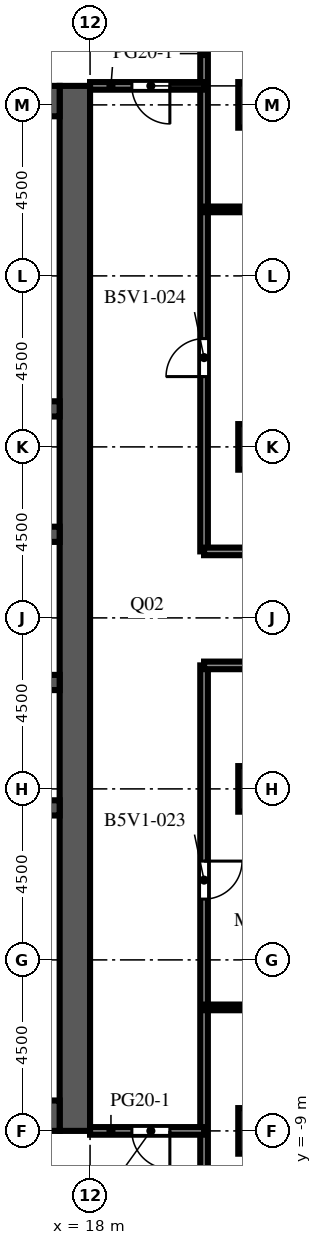
"""IFC4 building model, lengths in metres.
Left out: names, types, materials, properties, quantities, classifications, styles, units other than length and angle.
Written with IfcOpenShell. Run it as: python <this file> out.ifc"""

import sys

from ifc_helpers import new_model, si_unit, direction, frame, frame_2d, origin, origin_2d, place, context, subcontext, project, spatial, rectangle, extrude, element, fill, save


model = new_model("IFC4")
c1 = context("Model", 3, precision=1e-05, world=origin(), true_north=direction((0.0, 1.0)))
c2 = subcontext(c1, "Body", "Model", "MODEL_VIEW")
j1 = project(units=[si_unit("LENGTHUNIT", "METRE"), si_unit("PLANEANGLEUNIT", "RADIAN")], contexts=[c1])
p1 = place(None, origin())
s1 = spatial("IfcSite", under=j1, at=p1, CompositionType="ELEMENT")
p2 = place(p1, origin())
s2 = spatial("IfcBuilding", under=s1, at=p2, CompositionType="ELEMENT")
p3 = place(p2, frame((0.0, 0.0, 173.2)))
s3 = spatial("IfcBuildingStorey", under=s2, at=p3, CompositionType="ELEMENT", Elevation=173.2)
for number, where, z_axis, x_axis in (
    (1, (22.5, -9.0, 0.0), (0.0, 0.0, 1.0), (1.0, 0.0, 0.0)),
    (2, (22.5, 0.0, 0.0), (0.0, 0.0, 1.0), (1.0, 0.0, 0.0)),
    (3, (22.5, 9.0, 0.0), (0.0, 0.0, 1.0), (1.0, 0.0, 0.0)),
    (4, (22.5, 18.0, 0.0), (0.0, 0.0, 1.0), (1.0, 0.0, 0.0)),
):
    element("IfcColumn", number, at=place(p3, frame(where, z_axis=z_axis, x_axis=x_axis)), inside=s3, PredefinedType="COLUMN", context=c2, shape_type="SweptSolid", body=[
        extrude(rectangle(XDim=1.2, YDim=1.2, at=origin_2d()), origin(), (0.0, 0.0, 1.0), 4.1),
    ])
p4 = place(p3, frame((17.6, -9.0, 0.0), z_axis=(0.0, 0.0, 1.0), x_axis=(0.0, 1.0, 0.0)))
e5 = element("IfcWall", 5, at=p4, inside=s3, PredefinedType="SHEAR", context=c2, shape_type="SweptSolid", body=[
    extrude(rectangle(XDim=27.5, YDim=0.8, at=frame_2d((13.75, 0.0))), origin(), (0.0, 0.0, 1.0), 4.1),
])
p5 = place(p4, frame((12.55, 0.0, 0.0)))
e6 = element("IfcOpeningElement", 6, at=p5, cuts=e5, PredefinedType="OPENING", context=c2, shape_type="SweptSolid", body=[
    extrude(rectangle(XDim=2.4, YDim=2.4, at=frame_2d((1.2, 1.2))), frame((0.0, 0.41, 0.0), z_axis=(0.0, -1.0, 0.0), x_axis=(1.0, 0.0, 0.0)), (0.0, 0.0, 1.0), 0.82),
])
p6 = place(p4, frame((6.825, 0.0, 0.0)))
e7 = element("IfcOpeningElement", 7, at=p6, cuts=e5, PredefinedType="OPENING", context=c2, shape_type="SweptSolid", body=[
    extrude(rectangle(XDim=1.2, YDim=2.1, at=frame_2d((0.6, 1.05))), frame((0.0, 0.41, 0.0), z_axis=(0.0, -1.0, 0.0), x_axis=(1.0, 0.0, 0.0)), (0.0, 0.0, 1.0), 0.82),
])
p7 = place(p4, frame((19.475, 0.0, 0.0)))
e8 = element("IfcOpeningElement", 8, at=p7, cuts=e5, PredefinedType="OPENING", context=c2, shape_type="SweptSolid", body=[
    extrude(rectangle(XDim=1.2, YDim=2.1, at=frame_2d((0.6, 1.05))), frame((0.0, 0.41, 0.0), z_axis=(0.0, -1.0, 0.0), x_axis=(1.0, 0.0, 0.0)), (0.0, 0.0, 1.0), 0.82),
])
for number, where, z_axis, x_axis in (
    (9, (6.8, -8.6, 0.0), (0.0, 0.0, 1.0), (1.0, 0.0, 0.0)),
    (10, (6.8, 18.1, 0.0), (0.0, 0.0, 1.0), (1.0, 0.0, 0.0)),
):
    element("IfcWall", number, at=place(p3, frame(where, z_axis=z_axis, x_axis=x_axis)), inside=s3, PredefinedType="SHEAR", context=c2, shape_type="SweptSolid", body=[
        extrude(rectangle(XDim=10.4, YDim=0.8, at=frame_2d((5.2, 0.0))), origin(), (0.0, 0.0, 1.0), 4.1),
    ])
p8 = place(p3, frame((6.8, -0.5, 0.0), z_axis=(0.0, 0.0, 1.0), x_axis=(1.0, 0.0, 0.0)))
e11 = element("IfcWall", 11, at=p8, inside=s3, PredefinedType="SHEAR", context=c2, shape_type="SweptSolid", body=[
    extrude(rectangle(XDim=10.4, YDim=0.4, at=frame_2d((5.2, 0.0))), origin(), (0.0, 0.0, 1.0), 4.1),
])
p9 = place(p3, frame((6.8, 2.8, 0.0), z_axis=(0.0, 0.0, 1.0), x_axis=(1.0, 0.0, 0.0)))
e12 = element("IfcWall", 12, at=p9, inside=s3, PredefinedType="SHEAR", context=c2, shape_type="SweptSolid", body=[
    extrude(rectangle(XDim=10.4, YDim=0.4, at=frame_2d((5.2, 0.0))), origin(), (0.0, 0.0, 1.0), 4.1),
])
p10 = place(p9, frame((0.738, 0.0, 0.0)))
e13 = element("IfcOpeningElement", 13, at=p10, cuts=e12, PredefinedType="OPENING", context=c2, shape_type="SweptSolid", body=[
    extrude(rectangle(XDim=1.1, YDim=2.1, at=frame_2d((0.55, 1.05))), frame((0.0, 0.21, 0.0), z_axis=(0.0, -1.0, 0.0), x_axis=(1.0, 0.0, 0.0)), (0.0, 0.0, 1.0), 0.42),
])
p11 = place(p9, frame((3.337, 0.0, 0.0)))
e14 = element("IfcOpeningElement", 14, at=p11, cuts=e12, PredefinedType="OPENING", context=c2, shape_type="SweptSolid", body=[
    extrude(rectangle(XDim=1.1, YDim=2.1, at=frame_2d((0.55, 1.05))), frame((0.0, 0.21, 0.0), z_axis=(0.0, -1.0, 0.0), x_axis=(1.0, 0.0, 0.0)), (0.0, 0.0, 1.0), 0.42),
])
p12 = place(p9, frame((6.012, 0.0, 0.0)))
e15 = element("IfcOpeningElement", 15, at=p12, cuts=e12, PredefinedType="OPENING", context=c2, shape_type="SweptSolid", body=[
    extrude(rectangle(XDim=1.0, YDim=2.1, at=frame_2d((0.5, 1.05))), frame((0.0, 0.21, 0.0), z_axis=(0.0, -1.0, 0.0), x_axis=(1.0, 0.0, 0.0)), (0.0, 0.0, 1.0), 0.42),
])
p13 = place(p9, frame((8.613, 0.0, 0.0)))
e16 = element("IfcOpeningElement", 16, at=p13, cuts=e12, PredefinedType="OPENING", context=c2, shape_type="SweptSolid", body=[
    extrude(rectangle(XDim=1.0, YDim=2.1, at=frame_2d((0.5, 1.05))), frame((0.0, 0.21, 0.0), z_axis=(0.0, -1.0, 0.0), x_axis=(1.0, 0.0, 0.0)), (0.0, 0.0, 1.0), 0.42),
])
p14 = place(p3, frame((6.8, 6.7, 0.0), z_axis=(0.0, 0.0, 1.0), x_axis=(1.0, 0.0, 0.0)))
e17 = element("IfcWall", 17, at=p14, inside=s3, PredefinedType="SHEAR", context=c2, shape_type="SweptSolid", body=[
    extrude(rectangle(XDim=10.4, YDim=0.4, at=frame_2d((5.2, 0.0))), origin(), (0.0, 0.0, 1.0), 4.1),
])
p15 = place(p14, frame((3.337, 0.0, 0.0)))
e18 = element("IfcOpeningElement", 18, at=p15, cuts=e17, PredefinedType="OPENING", context=c2, shape_type="SweptSolid", body=[
    extrude(rectangle(XDim=1.1, YDim=2.1, at=frame_2d((0.55, 1.05))), frame((0.0, 0.21, 0.0), z_axis=(0.0, -1.0, 0.0), x_axis=(1.0, 0.0, 0.0)), (0.0, 0.0, 1.0), 0.42),
])
p16 = place(p14, frame((5.962, 0.0, 0.0)))
e19 = element("IfcOpeningElement", 19, at=p16, cuts=e17, PredefinedType="OPENING", context=c2, shape_type="SweptSolid", body=[
    extrude(rectangle(XDim=1.1, YDim=2.1, at=frame_2d((0.55, 1.05))), frame((0.0, 0.21, 0.0), z_axis=(0.0, -1.0, 0.0), x_axis=(1.0, 0.0, 0.0)), (0.0, 0.0, 1.0), 0.42),
])
p17 = place(p14, frame((8.663, 0.0, 0.0)))
e20 = element("IfcOpeningElement", 20, at=p17, cuts=e17, PredefinedType="OPENING", context=c2, shape_type="SweptSolid", body=[
    extrude(rectangle(XDim=1.1, YDim=2.1, at=frame_2d((0.55, 1.05))), frame((0.0, 0.21, 0.0), z_axis=(0.0, -1.0, 0.0), x_axis=(1.0, 0.0, 0.0)), (0.0, 0.0, 1.0), 0.42),
])
p18 = place(p14, frame((0.688, 0.0, 0.0)))
e21 = element("IfcOpeningElement", 21, at=p18, cuts=e17, PredefinedType="OPENING", context=c2, shape_type="SweptSolid", body=[
    extrude(rectangle(XDim=1.0, YDim=2.1, at=frame_2d((0.5, 1.05))), frame((0.0, 0.21, 0.0), z_axis=(0.0, -1.0, 0.0), x_axis=(1.0, 0.0, 0.0)), (0.0, 0.0, 1.0), 0.42),
])
p19 = place(p3, frame((6.8, 10.0, 0.0), z_axis=(0.0, 0.0, 1.0), x_axis=(1.0, 0.0, 0.0)))
e22 = element("IfcWall", 22, at=p19, inside=s3, PredefinedType="SHEAR", context=c2, shape_type="SweptSolid", body=[
    extrude(rectangle(XDim=10.4, YDim=0.4, at=frame_2d((5.2, 0.0))), origin(), (0.0, 0.0, 1.0), 4.1),
])
p20 = place(p3, frame((21.0, 3.25, 0.0), z_axis=(0.0, 0.0, 1.0), x_axis=(0.0, -1.0, 0.0)))
e23 = element("IfcWall", 23, at=p20, inside=s3, PredefinedType="PARTITIONING", context=c2, shape_type="SweptSolid", body=[
    extrude(rectangle(XDim=30.1, YDim=0.2, at=frame_2d((15.05, 0.0))), origin(), (0.0, 0.0, 1.0), 3.65),
])
p21 = place(p20, frame((5.15, 0.0, 0.0)))
e24 = element("IfcOpeningElement", 24, at=p21, cuts=e23, PredefinedType="OPENING", context=c2, shape_type="SweptSolid", body=[
    extrude(rectangle(XDim=1.0, YDim=2.1, at=frame_2d((0.5, 1.05))), frame((0.0, 0.11, 0.0), z_axis=(0.0, -1.0, 0.0), x_axis=(1.0, 0.0, 0.0)), (0.0, 0.0, 1.0), 0.22),
])
p22 = place(p3, frame((21.0, 26.85, 0.0), z_axis=(0.0, 0.0, 1.0), x_axis=(0.0, -1.0, 0.0)))
e25 = element("IfcWall", 25, at=p22, inside=s3, PredefinedType="PARTITIONING", context=c2, shape_type="SweptSolid", body=[
    extrude(rectangle(XDim=20.6, YDim=0.2, at=frame_2d((10.3, 0.0))), origin(), (0.0, 0.0, 1.0), 3.65),
])
p23 = place(p22, frame((15.0, 0.0, 0.0)))
e26 = element("IfcOpeningElement", 26, at=p23, cuts=e25, PredefinedType="OPENING", context=c2, shape_type="SweptSolid", body=[
    extrude(rectangle(XDim=1.0, YDim=2.1, at=frame_2d((0.5, 1.05))), frame((0.0, 0.11, 0.0), z_axis=(0.0, -1.0, 0.0), x_axis=(1.0, 0.0, 0.0)), (0.0, 0.0, 1.0), 0.22),
])
p24 = place(p3, frame((21.0, -9.0, 0.0), z_axis=(0.0, 0.0, 1.0), x_axis=(-1.0, 0.0, 0.0)))
e27 = element("IfcWall", 27, at=p24, inside=s3, PredefinedType="PARTITIONING", context=c2, shape_type="SweptSolid", body=[
    extrude(rectangle(XDim=3.0, YDim=0.2, at=frame_2d((1.5, 0.0))), origin(), (0.0, 0.0, 1.0), 3.65),
])
p25 = place(p24, frame((0.9, 0.0, 0.0)))
e28 = element("IfcOpeningElement", 28, at=p25, cuts=e27, PredefinedType="OPENING", context=c2, shape_type="SweptSolid", body=[
    extrude(rectangle(XDim=1.0, YDim=2.1, at=frame_2d((0.5, 1.05))), frame((0.0, 0.11, 0.0), z_axis=(0.0, -1.0, 0.0), x_axis=(1.0, 0.0, 0.0)), (0.0, 0.0, 1.0), 0.22),
])
p26 = place(p3, frame((26.85, -5.75, 0.0), z_axis=(0.0, 0.0, 1.0), x_axis=(-1.0, 0.0, 0.0)))
e29 = element("IfcWall", 29, at=p26, inside=s3, PredefinedType="PARTITIONING", context=c2, shape_type="SweptSolid", body=[
    extrude(rectangle(XDim=5.85, YDim=0.15, at=frame_2d((2.925, 0.0))), origin(), (0.0, 0.0, 1.0), 3.65),
])
p27 = place(p26, frame((2.25, 0.0, 0.0)))
e30 = element("IfcOpeningElement", 30, at=p27, cuts=e29, PredefinedType="OPENING", context=c2, shape_type="SweptSolid", body=[
    extrude(rectangle(XDim=1.0, YDim=2.1, at=frame_2d((0.5, 1.05))), frame((0.0, 0.085, 0.0), z_axis=(0.0, -1.0, 0.0), x_axis=(1.0, 0.0, 0.0)), (0.0, 0.0, 1.0), 0.17),
])
for number, where, z_axis, x_axis in (
    (31, (21.0, 3.25, 0.0), (0.0, 0.0, 1.0), (1.0, 0.0, 0.0)),
    (32, (21.0, 6.25, 0.0), (0.0, 0.0, 1.0), (1.0, 0.0, 0.0)),
):
    element("IfcWall", number, at=place(p3, frame(where, z_axis=z_axis, x_axis=x_axis)), inside=s3, PredefinedType="PARTITIONING", context=c2, shape_type="SweptSolid", body=[
        extrude(rectangle(XDim=5.85, YDim=0.2, at=frame_2d((2.925, 0.0))), origin(), (0.0, 0.0, 1.0), 3.65),
    ])
p28 = place(p3, frame((21.0, 15.25, 0.0), z_axis=(0.0, 0.0, 1.0), x_axis=(1.0, 0.0, 0.0)))
e33 = element("IfcWall", 33, at=p28, inside=s3, PredefinedType="PARTITIONING", context=c2, shape_type="SweptSolid", body=[
    extrude(rectangle(XDim=5.85, YDim=0.15, at=frame_2d((2.925, 0.0))), origin(), (0.0, 0.0, 1.0), 3.65),
])
p29 = place(p28, frame((3.1, 0.0, 0.0)))
e34 = element("IfcOpeningElement", 34, at=p29, cuts=e33, PredefinedType="OPENING", context=c2, shape_type="SweptSolid", body=[
    extrude(rectangle(XDim=1.0, YDim=2.1, at=frame_2d((0.5, 1.05))), frame((0.0, 0.085, 0.0), z_axis=(0.0, -1.0, 0.0), x_axis=(1.0, 0.0, 0.0)), (0.0, 0.0, 1.0), 0.17),
])
p30 = place(p3, frame((18.0, 18.5, 0.0), z_axis=(0.0, 0.0, 1.0), x_axis=(1.0, 0.0, 0.0)))
e35 = element("IfcWall", 35, at=p30, inside=s3, PredefinedType="PARTITIONING", context=c2, shape_type="SweptSolid", body=[
    extrude(rectangle(XDim=3.0, YDim=0.2, at=frame_2d((1.5, 0.0))), origin(), (0.0, 0.0, 1.0), 3.65),
])
p31 = place(p30, frame((1.1, 0.0, 0.0)))
e36 = element("IfcOpeningElement", 36, at=p31, cuts=e35, PredefinedType="OPENING", context=c2, shape_type="SweptSolid", body=[
    extrude(rectangle(XDim=1.0, YDim=2.1, at=frame_2d((0.5, 1.05))), frame((0.0, 0.11, 0.0), z_axis=(0.0, -1.0, 0.0), x_axis=(1.0, 0.0, 0.0)), (0.0, 0.0, 1.0), 0.22),
])
p32 = place(p5, origin())
e37 = element("IfcDoor", 37, at=p32, inside=s3, OperationType="DOUBLE_DOOR_DOUBLE_SWING", PredefinedType="DOOR", context=c2, shape_type="SweptSolid", body=[
    extrude(rectangle(XDim=2.4, YDim=2.4, at=frame_2d((1.2, 1.2))), frame((0.0, 0.025, 0.0), z_axis=(0.0, -1.0, 0.0), x_axis=(1.0, 0.0, 0.0)), (0.0, 0.0, 1.0), 0.05),
])
fill(e6, e37)
p33 = place(p6, frame((1.2, 0.0, 0.0), z_axis=(0.0, 0.0, 1.0), x_axis=(-1.0, 0.0, 0.0)))
e38 = element("IfcDoor", 38, at=p33, inside=s3, OperationType="SINGLE_SWING_LEFT", PredefinedType="DOOR", context=c2, shape_type="SweptSolid", body=[
    extrude(rectangle(XDim=1.2, YDim=2.1, at=frame_2d((0.6, 1.05))), frame((0.0, 0.025, 0.0), z_axis=(0.0, -1.0, 0.0), x_axis=(1.0, 0.0, 0.0)), (0.0, 0.0, 1.0), 0.05),
])
fill(e7, e38)
p34 = place(p7, frame((1.2, 0.0, 0.0), z_axis=(0.0, 0.0, 1.0), x_axis=(-1.0, 0.0, 0.0)))
e39 = element("IfcDoor", 39, at=p34, inside=s3, OperationType="SINGLE_SWING_LEFT", PredefinedType="DOOR", context=c2, shape_type="SweptSolid", body=[
    extrude(rectangle(XDim=1.2, YDim=2.1, at=frame_2d((0.6, 1.05))), frame((0.0, 0.025, 0.0), z_axis=(0.0, -1.0, 0.0), x_axis=(1.0, 0.0, 0.0)), (0.0, 0.0, 1.0), 0.05),
])
fill(e8, e39)
p35 = place(p25, origin())
e40 = element("IfcDoor", 40, at=p35, inside=s3, OperationType="SINGLE_SWING_LEFT", PredefinedType="DOOR", context=c2, shape_type="SweptSolid", body=[
    extrude(rectangle(XDim=1.0, YDim=2.1, at=frame_2d((0.5, 1.05))), frame((0.0, 0.025, 0.0), z_axis=(0.0, -1.0, 0.0), x_axis=(1.0, 0.0, 0.0)), (0.0, 0.0, 1.0), 0.05),
])
fill(e28, e40)
p36 = place(p31, origin())
e41 = element("IfcDoor", 41, at=p36, inside=s3, OperationType="SINGLE_SWING_RIGHT", PredefinedType="DOOR", context=c2, shape_type="SweptSolid", body=[
    extrude(rectangle(XDim=1.0, YDim=2.1, at=frame_2d((0.5, 1.05))), frame((0.0, 0.025, 0.0), z_axis=(0.0, -1.0, 0.0), x_axis=(1.0, 0.0, 0.0)), (0.0, 0.0, 1.0), 0.05),
])
fill(e36, e41)
p37 = place(p21, origin())
e42 = element("IfcDoor", 42, at=p37, inside=s3, OperationType="SINGLE_SWING_LEFT", PredefinedType="DOOR", context=c2, shape_type="SweptSolid", body=[
    extrude(rectangle(XDim=1.0, YDim=2.1, at=frame_2d((0.5, 1.05))), frame((0.0, 0.025, 0.0), z_axis=(0.0, -1.0, 0.0), x_axis=(1.0, 0.0, 0.0)), (0.0, 0.0, 1.0), 0.05),
])
fill(e24, e42)
p38 = place(p23, origin())
e43 = element("IfcDoor", 43, at=p38, inside=s3, OperationType="SINGLE_SWING_RIGHT", PredefinedType="DOOR", context=c2, shape_type="SweptSolid", body=[
    extrude(rectangle(XDim=1.0, YDim=2.1, at=frame_2d((0.5, 1.05))), frame((0.0, 0.025, 0.0), z_axis=(0.0, -1.0, 0.0), x_axis=(1.0, 0.0, 0.0)), (0.0, 0.0, 1.0), 0.05),
])
fill(e26, e43)
save(model, sys.argv[1])
